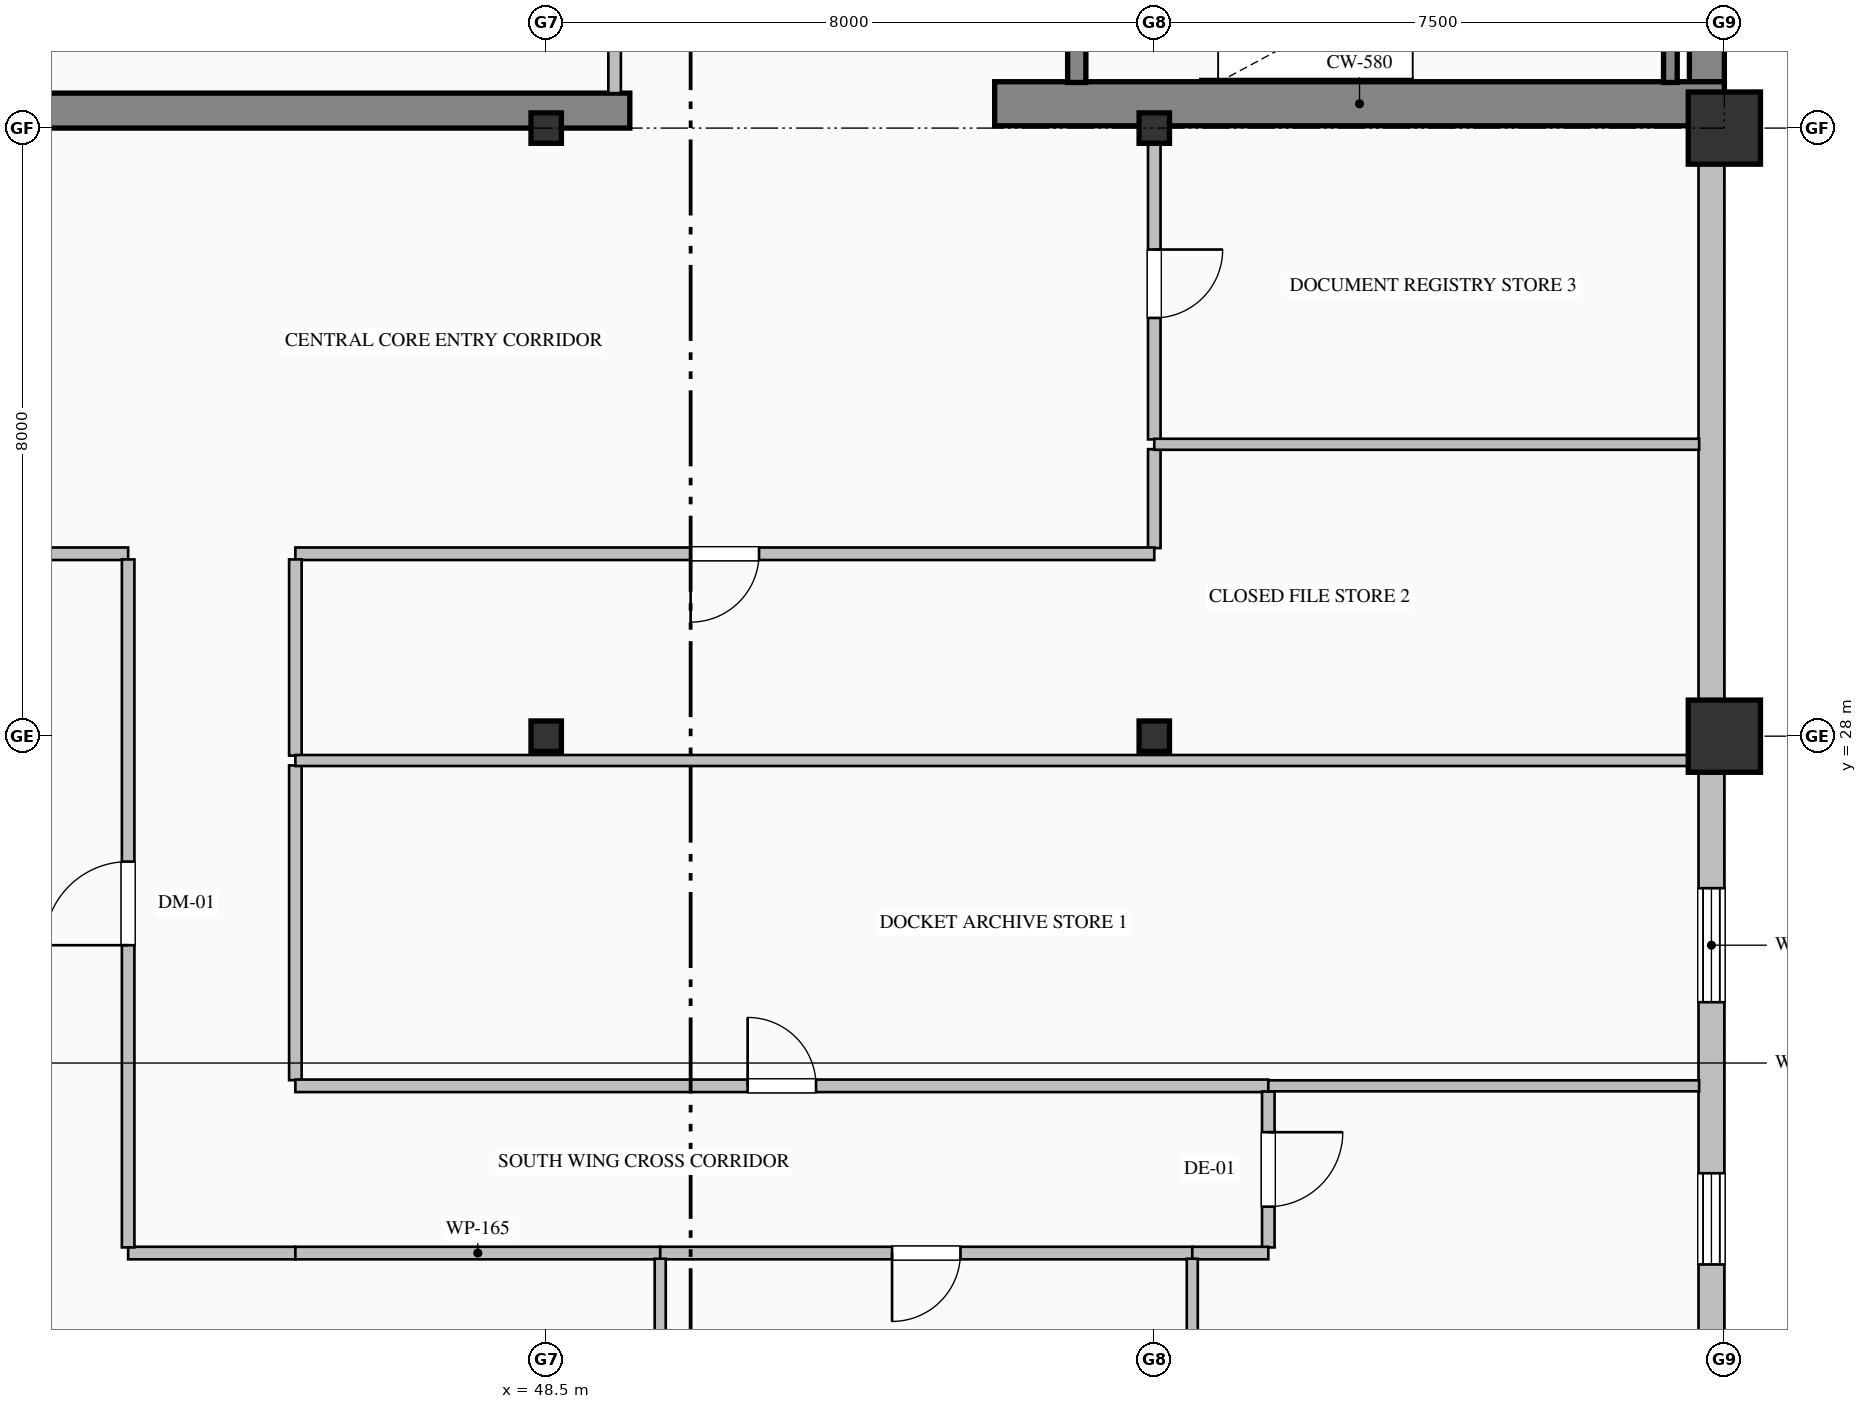
"""IFC4 building model, lengths in metres.
Left out: names, types, materials, properties, quantities, classifications, styles, units other than length and angle.
Written with IfcOpenShell. Run it as: python <this file> out.ifc"""

import sys

from ifc_helpers import new_model, si_unit, direction, frame, frame_2d, origin, origin_2d, place, context, subcontext, project, spatial, rectangle, hollow_rectangle, i_section, extrude, element, fill, save


model = new_model("IFC4")
c1 = context("Model", 3, precision=1e-05, world=origin(), true_north=direction((0.0, 1.0)))
c2 = subcontext(c1, "Body", "Model", "MODEL_VIEW")
j1 = project(units=[si_unit("LENGTHUNIT", "METRE"), si_unit("PLANEANGLEUNIT", "RADIAN")], contexts=[c1])
p1 = place(None, origin())
s1 = spatial("IfcSite", under=j1, at=p1, CompositionType="ELEMENT")
p2 = place(p1, origin())
s2 = spatial("IfcBuilding", under=s1, at=p2, CompositionType="ELEMENT")
p3 = place(p2, frame((0.0, 0.0, 273.8)))
s3 = spatial("IfcBuildingStorey", under=s2, at=p3, CompositionType="ELEMENT", Elevation=273.8)
p4 = place(p3, frame((63.77, 36.32, 0.0), z_axis=(0.0, 0.0, 1.0), x_axis=(0.0, 1.0, 0.0)))
e1 = element("IfcWall", 1, at=p4, inside=s3, PredefinedType="SHEAR", context=c2, shape_type="SweptSolid", body=[
    extrude(rectangle(XDim=15.22, YDim=0.46, at=frame_2d((7.61, 0.0))), origin(), (0.0, 0.0, 1.0), 3.775),
])
p5 = place(p3, frame((40.5, 36.23, 0.0), z_axis=(0.0, 0.0, 1.0), x_axis=(1.0, 0.0, 0.0)))
e2 = element("IfcWall", 2, at=p5, inside=s3, PredefinedType="SHEAR", context=c2, shape_type="SweptSolid", body=[
    extrude(rectangle(XDim=9.1, YDim=0.46, at=frame_2d((4.55, 0.0))), origin(), (0.0, 0.0, 1.0), 3.775),
])
p6 = place(p3, frame((54.4, 36.32, 0.0), z_axis=(0.0, 0.0, 1.0), x_axis=(1.0, 0.0, 0.0)))
e3 = element("IfcWall", 3, at=p6, inside=s3, PredefinedType="SHEAR", context=c2, shape_type="SweptSolid", body=[
    extrude(rectangle(XDim=9.6, YDim=0.58, at=frame_2d((4.8, 0.0))), origin(), (0.0, 0.0, 1.0), 4.0),
])
for number, where, z_axis, x_axis in (
    (4, (48.5, 28.0, 0.0), (0.0, 0.0, 1.0), (1.0, 0.0, 0.0)),
    (5, (48.5, 36.0, 0.0), (0.0, 0.0, 1.0), (1.0, 0.0, 0.0)),
    (6, (56.5, 28.0, 0.0), (0.0, 0.0, 1.0), (1.0, 0.0, 0.0)),
    (7, (56.5, 36.0, 0.0), (0.0, 0.0, 1.0), (1.0, 0.0, 0.0)),
):
    element("IfcColumn", number, at=place(p3, frame(where, z_axis=z_axis, x_axis=x_axis)), inside=s3, PredefinedType="COLUMN", context=c2, shape_type="SweptSolid", body=[
        extrude(i_section(OverallWidth=0.4, OverallDepth=0.4, WebThickness=0.013, FlangeThickness=0.021, FilletRadius=0.022, at=origin_2d()), origin(), (0.0, 0.0, 1.0), 4.0),
    ])
for number, where, z_axis, x_axis in (
    (8, (64.0, 28.0, 0.0), (0.0, 0.0, 1.0), (1.0, 0.0, 0.0)),
    (9, (64.0, 36.0, 0.0), (0.0, 0.0, 1.0), (1.0, 0.0, 0.0)),
):
    element("IfcColumn", number, at=place(p3, frame(where, z_axis=z_axis, x_axis=x_axis)), inside=s3, PredefinedType="COLUMN", context=c2, shape_type="SweptSolid", body=[
        extrude(hollow_rectangle(XDim=0.95, YDim=0.95, WallThickness=0.036, at=origin_2d()), origin(), (0.0, 0.0, 1.0), 4.0),
    ])
p7 = place(p3, frame((63.83, 36.05, 0.0), z_axis=(0.0, 0.0, 1.0), x_axis=(0.0, -1.0, 0.0)))
e10 = element("IfcWall", 10, at=p7, inside=s3, PredefinedType="SOLIDWALL", context=c2, shape_type="SweptSolid", body=[
    extrude(rectangle(XDim=19.55, YDim=0.34, at=frame_2d((9.775, 0.0))), origin(), (0.0, 0.0, 1.0), 3.325),
])
p8 = place(p7, frame((10.05, 0.0, 0.7)))
e11 = element("IfcOpeningElement", 11, at=p8, cuts=e10, PredefinedType="OPENING", context=c2, shape_type="SweptSolid", body=[
    extrude(rectangle(XDim=1.5, YDim=2.4, at=frame_2d((0.75, 1.2))), frame((0.0, 0.18, 0.0), z_axis=(0.0, -1.0, 0.0), x_axis=(1.0, 0.0, 0.0)), (0.0, 0.0, 1.0), 0.36),
])
p9 = place(p7, frame((13.8, 0.0, 0.9)))
e12 = element("IfcOpeningElement", 12, at=p9, cuts=e10, PredefinedType="OPENING", context=c2, shape_type="SweptSolid", body=[
    extrude(rectangle(XDim=1.2, YDim=1.85, at=frame_2d((0.6, 0.925))), frame((0.0, 0.18, 0.0), z_axis=(0.0, -1.0, 0.0), x_axis=(1.0, 0.0, 0.0)), (0.0, 0.0, 1.0), 0.36),
])
p10 = place(p3, frame((55.48, 39.75, 0.0), z_axis=(0.0, 0.0, 1.0), x_axis=(0.0, -1.0, 0.0)))
e13 = element("IfcWall", 13, at=p10, inside=s3, PredefinedType="SOLIDWALL", context=c2, shape_type="SweptSolid", body=[
    extrude(rectangle(XDim=3.15, YDim=0.24, at=frame_2d((1.575, 0.0))), origin(), (0.0, 0.0, 1.0), 4.0),
])
p11 = place(p10, frame((1.0, 0.0, 0.0)))
e14 = element("IfcOpeningElement", 14, at=p11, cuts=e13, PredefinedType="OPENING", context=c2, shape_type="SweptSolid", body=[
    extrude(rectangle(XDim=1.15, YDim=2.2, at=frame_2d((0.575, 1.1))), frame((0.0, 0.13, 0.0), z_axis=(0.0, -1.0, 0.0), x_axis=(1.0, 0.0, 0.0)), (0.0, 0.0, 1.0), 0.26),
])
p12 = place(p3, frame((63.29, 36.6, 0.0), z_axis=(0.0, 0.0, 1.0), x_axis=(0.0, 1.0, 0.0)))
e15 = element("IfcWall", 15, at=p12, inside=s3, PredefinedType="SOLIDWALL", context=c2, shape_type="SweptSolid", body=[
    extrude(rectangle(XDim=3.15, YDim=0.18, at=frame_2d((1.575, 0.0))), origin(), (0.0, 0.0, 1.0), 4.0),
])
p13 = place(p3, frame((49.4, 36.46, 0.0), z_axis=(0.0, 0.0, 1.0), x_axis=(0.0, 1.0, 0.0)))
e16 = element("IfcWall", 16, at=p13, inside=s3, PredefinedType="PARTITIONING", context=c2, shape_type="SweptSolid", body=[
    extrude(rectangle(XDim=3.853, YDim=0.165, at=frame_2d((1.927, 0.0))), origin(), (0.0, 0.0, 1.0), 3.017),
])
p14 = place(p13, frame((1.477, 0.0, 0.0)))
e17 = element("IfcOpeningElement", 17, at=p14, cuts=e16, PredefinedType="OPENING", context=c2, shape_type="SweptSolid", body=[
    extrude(rectangle(XDim=0.9, YDim=2.15, at=frame_2d((0.45, 1.075))), frame((0.0, 0.093, 0.0), z_axis=(0.0, -1.0, 0.0), x_axis=(1.0, 0.0, 0.0)), (0.0, 0.0, 1.0), 0.185),
])
p15 = place(p3, frame((56.5, 31.775, 0.0), z_axis=(0.0, 0.0, 1.0), x_axis=(0.0, -1.0, 0.0)))
e18 = element("IfcWall", 18, at=p15, inside=s3, PredefinedType="PARTITIONING", context=c2, shape_type="SweptSolid", body=[
    extrude(rectangle(XDim=1.301, YDim=0.165, at=frame_2d((0.65, 0.0))), origin(), (0.0, 0.0, 1.0), 3.179),
])
p16 = place(p3, frame((56.5, 30.4, 0.0), z_axis=(0.0, 0.0, 1.0), x_axis=(-1.0, 0.0, 0.0)))
e19 = element("IfcWall", 19, at=p16, inside=s3, PredefinedType="PARTITIONING", context=c2, shape_type="SweptSolid", body=[
    extrude(rectangle(XDim=11.3, YDim=0.165, at=frame_2d((5.65, 0.0))), origin(), (0.0, 0.0, 1.0), 3.775),
])
p17 = place(p16, frame((5.2, 0.0, 0.0)))
e20 = element("IfcOpeningElement", 20, at=p17, cuts=e19, PredefinedType="OPENING", context=c2, shape_type="SweptSolid", body=[
    extrude(rectangle(XDim=0.9, YDim=2.15, at=frame_2d((0.45, 1.075))), frame((0.0, 0.093, 0.0), z_axis=(0.0, -1.0, 0.0), x_axis=(1.0, 0.0, 0.0)), (0.0, 0.0, 1.0), 0.185),
])
p18 = place(p3, frame((56.5, 36.0, 0.0), z_axis=(0.0, 0.0, 1.0), x_axis=(0.0, -1.0, 0.0)))
e21 = element("IfcWall", 21, at=p18, inside=s3, PredefinedType="PARTITIONING", context=c2, shape_type="SweptSolid", body=[
    extrude(rectangle(XDim=4.095, YDim=0.165, at=frame_2d((2.048, 0.0))), origin(), (0.0, 0.0, 1.0), 3.179),
])
p19 = place(p18, frame((1.598, 0.0, 0.0)))
e22 = element("IfcOpeningElement", 22, at=p19, cuts=e21, PredefinedType="OPENING", context=c2, shape_type="SweptSolid", body=[
    extrude(rectangle(XDim=0.9, YDim=2.15, at=frame_2d((0.45, 1.075))), frame((0.0, 0.093, 0.0), z_axis=(0.0, -1.0, 0.0), x_axis=(1.0, 0.0, 0.0)), (0.0, 0.0, 1.0), 0.185),
])
p20 = place(p3, frame((43.0, 30.4, 0.0), z_axis=(0.0, 0.0, 1.0), x_axis=(-1.0, 0.0, 0.0)))
e23 = element("IfcWall", 23, at=p20, inside=s3, PredefinedType="PARTITIONING", context=c2, shape_type="SweptSolid", body=[
    extrude(rectangle(XDim=2.5, YDim=0.165, at=frame_2d((1.25, 0.0))), origin(), (0.0, 0.0, 1.0), 3.775),
])
p21 = place(p3, frame((45.2, 27.615, 0.0), z_axis=(0.0, 0.0, 1.0), x_axis=(0.0, -1.0, 0.0)))
e24 = element("IfcWall", 24, at=p21, inside=s3, PredefinedType="PARTITIONING", context=c2, shape_type="SweptSolid", body=[
    extrude(rectangle(XDim=4.141, YDim=0.165, at=frame_2d((2.07, 0.0))), origin(), (0.0, 0.0, 1.0), 3.775),
])
p22 = place(p3, frame((45.2, 30.325, 0.0), z_axis=(0.0, 0.0, 1.0), x_axis=(0.0, -1.0, 0.0)))
e25 = element("IfcWall", 25, at=p22, inside=s3, PredefinedType="PARTITIONING", context=c2, shape_type="SweptSolid", body=[
    extrude(rectangle(XDim=2.581, YDim=0.165, at=frame_2d((1.291, 0.0))), origin(), (0.0, 0.0, 1.0), 3.775),
])
p23 = place(p3, frame((45.2, 21.2, 0.0), z_axis=(0.0, 0.0, 1.0), x_axis=(-1.0, 0.0, 0.0)))
e26 = element("IfcWall", 26, at=p23, inside=s3, PredefinedType="PARTITIONING", context=c2, shape_type="SweptSolid", body=[
    extrude(rectangle(XDim=2.2, YDim=0.165, at=frame_2d((1.1, 0.0))), origin(), (0.0, 0.0, 1.0), 3.775),
])
p24 = place(p3, frame((43.0, 21.274, 0.0), z_axis=(0.0, 0.0, 1.0), x_axis=(0.0, 1.0, 0.0)))
e27 = element("IfcWall", 27, at=p24, inside=s3, PredefinedType="PARTITIONING", context=c2, shape_type="SweptSolid", body=[
    extrude(rectangle(XDim=9.051, YDim=0.165, at=frame_2d((4.525, 0.0))), origin(), (0.0, 0.0, 1.0), 3.775),
])
p25 = place(p24, frame((3.976, 0.0, 0.0)))
e28 = element("IfcOpeningElement", 28, at=p25, cuts=e27, PredefinedType="OPENING", context=c2, shape_type="SweptSolid", body=[
    extrude(rectangle(XDim=1.1, YDim=2.2, at=frame_2d((0.55, 1.1))), frame((0.0, 0.093, 0.0), z_axis=(0.0, -1.0, 0.0), x_axis=(1.0, 0.0, 0.0)), (0.0, 0.0, 1.0), 0.185),
])
p26 = place(p3, frame((45.2, 23.4, 0.0), z_axis=(0.0, 0.0, 1.0), x_axis=(1.0, 0.0, 0.0)))
e29 = element("IfcWall", 29, at=p26, inside=s3, PredefinedType="PARTITIONING", context=c2, shape_type="SweptSolid", body=[
    extrude(rectangle(XDim=12.8, YDim=0.165, at=frame_2d((6.4, 0.0))), origin(), (0.0, 0.0, 1.0), 3.467),
])
p27 = place(p26, frame((5.95, 0.0, 0.0)))
e30 = element("IfcOpeningElement", 30, at=p27, cuts=e29, PredefinedType="OPENING", context=c2, shape_type="SweptSolid", body=[
    extrude(rectangle(XDim=0.9, YDim=2.15, at=frame_2d((0.45, 1.075))), frame((0.0, 0.093, 0.0), z_axis=(0.0, -1.0, 0.0), x_axis=(1.0, 0.0, 0.0)), (0.0, 0.0, 1.0), 0.185),
])
p28 = place(p3, frame((50.0, 21.2, 0.0), z_axis=(0.0, 0.0, 1.0), x_axis=(-1.0, 0.0, 0.0)))
e31 = element("IfcWall", 31, at=p28, inside=s3, PredefinedType="PARTITIONING", context=c2, shape_type="SweptSolid", body=[
    extrude(rectangle(XDim=4.8, YDim=0.165, at=frame_2d((2.4, 0.0))), origin(), (0.0, 0.0, 1.0), 3.775),
])
p29 = place(p3, frame((57.0, 21.2, 0.0), z_axis=(0.0, 0.0, 1.0), x_axis=(-1.0, 0.0, 0.0)))
e32 = element("IfcWall", 32, at=p29, inside=s3, PredefinedType="PARTITIONING", context=c2, shape_type="SweptSolid", body=[
    extrude(rectangle(XDim=7.0, YDim=0.165, at=frame_2d((3.5, 0.0))), origin(), (0.0, 0.0, 1.0), 3.775),
])
p30 = place(p29, frame((3.05, 0.0, 0.0)))
e33 = element("IfcOpeningElement", 33, at=p30, cuts=e32, PredefinedType="OPENING", context=c2, shape_type="SweptSolid", body=[
    extrude(rectangle(XDim=0.9, YDim=2.15, at=frame_2d((0.45, 1.075))), frame((0.0, 0.093, 0.0), z_axis=(0.0, -1.0, 0.0), x_axis=(1.0, 0.0, 0.0)), (0.0, 0.0, 1.0), 0.185),
])
p31 = place(p3, frame((58.0, 23.325, 0.0), z_axis=(0.0, 0.0, 1.0), x_axis=(0.0, -1.0, 0.0)))
e34 = element("IfcWall", 34, at=p31, inside=s3, PredefinedType="PARTITIONING", context=c2, shape_type="SweptSolid", body=[
    extrude(rectangle(XDim=2.051, YDim=0.165, at=frame_2d((1.025, 0.0))), origin(), (0.0, 0.0, 1.0), 3.775),
])
p32 = place(p31, frame((0.535, 0.0, 0.0)))
e35 = element("IfcOpeningElement", 35, at=p32, cuts=e34, PredefinedType="OPENING", context=c2, shape_type="SweptSolid", body=[
    extrude(rectangle(XDim=0.98, YDim=2.25, at=frame_2d((0.49, 1.125))), frame((0.0, 0.093, 0.0), z_axis=(0.0, -1.0, 0.0), x_axis=(1.0, 0.0, 0.0)), (0.0, 0.0, 1.0), 0.185),
])
p33 = place(p3, frame((58.0, 21.2, 0.0), z_axis=(0.0, 0.0, 1.0), x_axis=(-1.0, 0.0, 0.0)))
e36 = element("IfcWall", 36, at=p33, inside=s3, PredefinedType="PARTITIONING", context=c2, shape_type="SweptSolid", body=[
    extrude(rectangle(XDim=1.0, YDim=0.165, at=frame_2d((0.5, 0.0))), origin(), (0.0, 0.0, 1.0), 3.775),
])
p34 = place(p3, frame((45.2, 27.68, 0.0), z_axis=(0.0, 0.0, 1.0), x_axis=(1.0, 0.0, 0.0)))
e37 = element("IfcWall", 37, at=p34, inside=s3, PredefinedType="PARTITIONING", context=c2, shape_type="SweptSolid", body=[
    extrude(rectangle(XDim=18.468, YDim=0.145, at=frame_2d((9.234, 0.0))), origin(), (0.0, 0.0, 1.0), 3.775),
])
p35 = place(p3, frame((63.668, 23.4, 0.0), z_axis=(0.0, 0.0, 1.0), x_axis=(-1.0, 0.0, 0.0)))
e38 = element("IfcWall", 38, at=p35, inside=s3, PredefinedType="PARTITIONING", context=c2, shape_type="SweptSolid", body=[
    extrude(rectangle(XDim=5.668, YDim=0.145, at=frame_2d((2.834, 0.0))), origin(), (0.0, 0.0, 1.0), 3.775),
])
p36 = place(p3, frame((56.5, 31.84, 0.0), z_axis=(0.0, 0.0, 1.0), x_axis=(1.0, 0.0, 0.0)))
e39 = element("IfcWall", 39, at=p36, inside=s3, PredefinedType="PARTITIONING", context=c2, shape_type="SweptSolid", body=[
    extrude(rectangle(XDim=7.168, YDim=0.145, at=frame_2d((3.584, 0.0))), origin(), (0.0, 0.0, 1.0), 3.775),
])
for number, where, z_axis, x_axis in (
    (40, (50.0, 21.125, 0.0), (0.0, 0.0, 1.0), (0.0, -1.0, 0.0)),
    (41, (57.0, 21.125, 0.0), (0.0, 0.0, 1.0), (0.0, -1.0, 0.0)),
):
    element("IfcWall", number, at=place(p3, frame(where, z_axis=z_axis, x_axis=x_axis)), inside=s3, PredefinedType="PARTITIONING", context=c2, shape_type="SweptSolid", body=[
        extrude(rectangle(XDim=8.293, YDim=0.145, at=frame_2d((4.147, 0.0))), origin(), (0.0, 0.0, 1.0), 3.775),
    ])
p37 = place(p8, origin())
e42 = element("IfcWindow", 42, at=p37, inside=s3, PartitioningType="DOUBLE_PANEL_HORIZONTAL", PredefinedType="WINDOW", context=c2, shape_type="SweptSolid", body=[
    extrude(rectangle(XDim=1.5, YDim=2.4, at=frame_2d((0.75, 1.2))), frame((0.0, 0.15, 0.0), z_axis=(0.0, -1.0, 0.0), x_axis=(1.0, 0.0, 0.0)), (0.0, 0.0, 1.0), 0.06),
])
fill(e11, e42)
p38 = place(p9, origin())
e43 = element("IfcWindow", 43, at=p38, inside=s3, PartitioningType="DOUBLE_PANEL_VERTICAL", PredefinedType="WINDOW", context=c2, shape_type="SweptSolid", body=[
    extrude(rectangle(XDim=1.2, YDim=1.85, at=frame_2d((0.6, 0.925))), frame((0.0, 0.15, 0.0), z_axis=(0.0, -1.0, 0.0), x_axis=(1.0, 0.0, 0.0)), (0.0, 0.0, 1.0), 0.06),
])
fill(e12, e43)
p39 = place(p27, origin())
e44 = element("IfcDoor", 44, at=p39, inside=s3, OperationType="SINGLE_SWING_LEFT", PredefinedType="DOOR", context=c2, shape_type="SweptSolid", body=[
    extrude(rectangle(XDim=0.9, YDim=2.15, at=frame_2d((0.45, 1.075))), frame((0.0, 0.025, 0.0), z_axis=(0.0, -1.0, 0.0), x_axis=(1.0, 0.0, 0.0)), (0.0, 0.0, 1.0), 0.05),
])
fill(e30, e44)
p40 = place(p17, origin())
e45 = element("IfcDoor", 45, at=p40, inside=s3, OperationType="SINGLE_SWING_RIGHT", PredefinedType="DOOR", context=c2, shape_type="SweptSolid", body=[
    extrude(rectangle(XDim=0.9, YDim=2.15, at=frame_2d((0.45, 1.075))), frame((0.0, 0.025, 0.0), z_axis=(0.0, -1.0, 0.0), x_axis=(1.0, 0.0, 0.0)), (0.0, 0.0, 1.0), 0.05),
])
fill(e20, e45)
p41 = place(p19, origin())
e46 = element("IfcDoor", 46, at=p41, inside=s3, OperationType="SINGLE_SWING_LEFT", PredefinedType="DOOR", context=c2, shape_type="SweptSolid", body=[
    extrude(rectangle(XDim=0.9, YDim=2.15, at=frame_2d((0.45, 1.075))), frame((0.0, 0.025, 0.0), z_axis=(0.0, -1.0, 0.0), x_axis=(1.0, 0.0, 0.0)), (0.0, 0.0, 1.0), 0.05),
])
fill(e22, e46)
p42 = place(p25, origin())
e47 = element("IfcDoor", 47, at=p42, inside=s3, OperationType="SINGLE_SWING_LEFT", PredefinedType="DOOR", context=c2, shape_type="SweptSolid", body=[
    extrude(rectangle(XDim=1.1, YDim=2.2, at=frame_2d((0.55, 1.1))), frame((0.0, 0.025, 0.0), z_axis=(0.0, -1.0, 0.0), x_axis=(1.0, 0.0, 0.0)), (0.0, 0.0, 1.0), 0.05),
])
fill(e28, e47)
p43 = place(p30, origin())
e48 = element("IfcDoor", 48, at=p43, inside=s3, OperationType="SINGLE_SWING_RIGHT", PredefinedType="DOOR", context=c2, shape_type="SweptSolid", body=[
    extrude(rectangle(XDim=0.9, YDim=2.15, at=frame_2d((0.45, 1.075))), frame((0.0, 0.025, 0.0), z_axis=(0.0, -1.0, 0.0), x_axis=(1.0, 0.0, 0.0)), (0.0, 0.0, 1.0), 0.05),
])
fill(e33, e48)
p44 = place(p32, origin())
e49 = element("IfcDoor", 49, at=p44, inside=s3, OperationType="SINGLE_SWING_LEFT", PredefinedType="DOOR", context=c2, shape_type="SweptSolid", body=[
    extrude(rectangle(XDim=0.98, YDim=2.25, at=frame_2d((0.49, 1.125))), frame((0.0, 0.025, 0.0), z_axis=(0.0, -1.0, 0.0), x_axis=(1.0, 0.0, 0.0)), (0.0, 0.0, 1.0), 0.05),
])
fill(e35, e49)
save(model, sys.argv[1])
